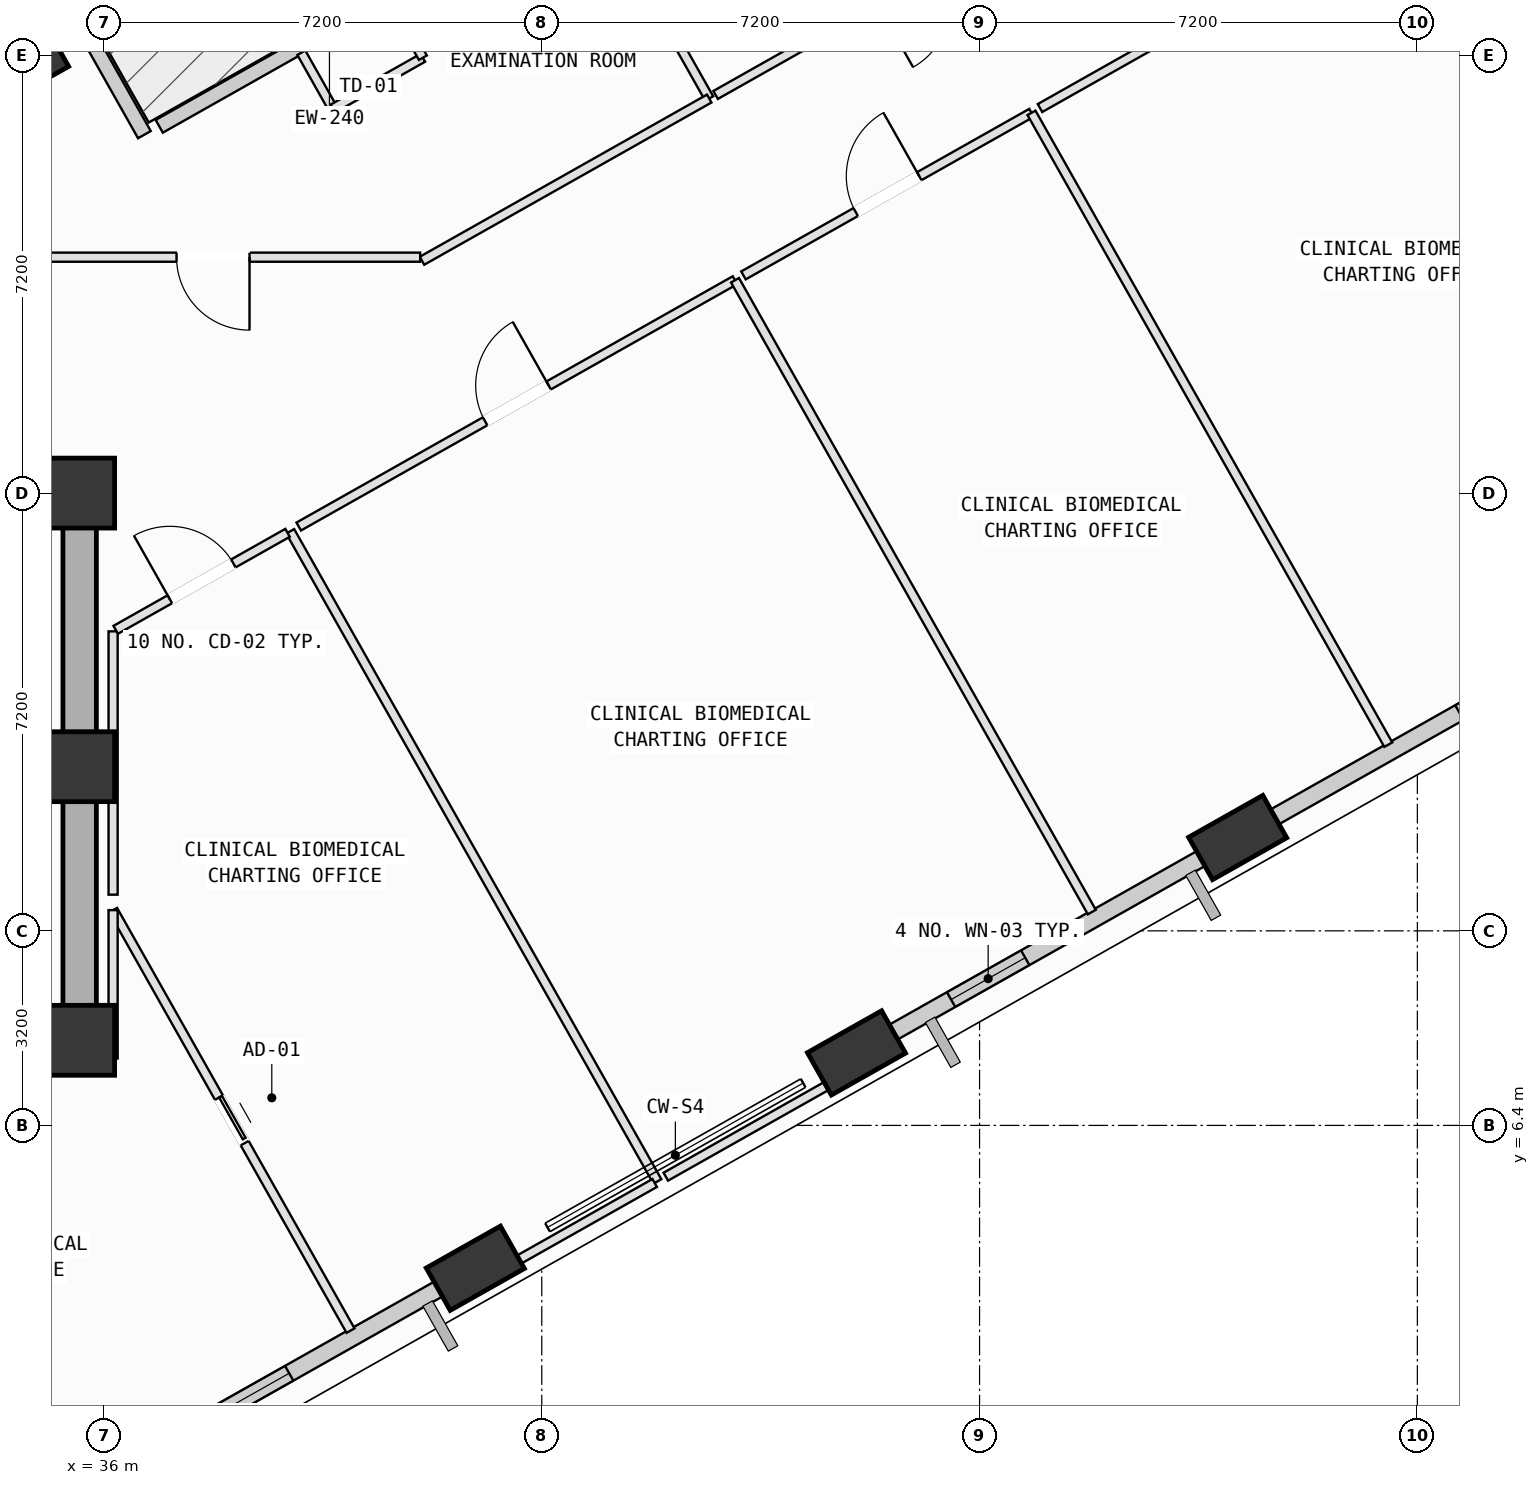
"""IFC4 building model, lengths in metres.
Left out: names, types, materials, properties, quantities, classifications, styles, units other than length and angle.
Written with IfcOpenShell. Run it as: python <this file> out.ifc"""

import sys

from ifc_helpers import new_model, si_unit, direction, frame, frame_2d, origin, origin_2d, place, context, subcontext, project, spatial, rectangle, extrude, element, fill, save


model = new_model("IFC4")
c1 = context("Model", 3, precision=1e-05, world=origin(), true_north=direction((0.0, 1.0)))
c2 = subcontext(c1, "Body", "Model", "MODEL_VIEW")
j1 = project(units=[si_unit("LENGTHUNIT", "METRE"), si_unit("PLANEANGLEUNIT", "RADIAN")], contexts=[c1])
p1 = place(None, origin())
s1 = spatial("IfcSite", under=j1, at=p1, CompositionType="ELEMENT")
p2 = place(p1, origin())
s2 = spatial("IfcBuilding", under=s1, at=p2, CompositionType="ELEMENT")
p3 = place(p2, frame((0.0, 0.0, 149.8)))
s3 = spatial("IfcBuildingStorey", under=s2, at=p3, CompositionType="ELEMENT", Elevation=149.8)
for number, where, z_axis, x_axis in (
    (1, (35.6, 7.8, 0.0), (0.0, 0.0, 1.0), (1.0, 0.0, 0.0)),
    (2, (35.6, 12.3, 0.0), (0.0, 0.0, 1.0), (1.0, 0.0, 0.0)),
    (3, (35.6, 16.8, 0.0), (0.0, 0.0, 1.0), (1.0, 0.0, 0.0)),
):
    element("IfcColumn", number, at=place(p3, frame(where, z_axis=z_axis, x_axis=x_axis)), inside=s3, PredefinedType="COLUMN", context=c2, shape_type="SweptSolid", body=[
        extrude(rectangle(XDim=1.15, YDim=1.15, at=origin_2d()), origin(), (0.0, 0.0, 1.0), 4.0),
    ])
p4 = place(p3, frame((42.107, 4.051, 0.067), z_axis=(0.08539199057, 0.035801565923, 0.995704000104), x_axis=(-0.78816883904, 0.613773060451, 0.045524844111)))
e4 = element("IfcColumn", 4, at=p4, inside=s3, PredefinedType="COLUMN", context=c2, shape_type="SweptSolid", body=[
    extrude(rectangle(XDim=1.4, YDim=0.8, at=origin_2d()), origin(), (0.0, 0.0, 1.0), 3.948),
])
p5 = place(p3, frame((48.376, 7.593, 0.067), z_axis=(0.07055831731, 0.061529820967, 0.995608158359), x_axis=(-0.941245694793, 0.334571211542, 0.046028756663)))
e5 = element("IfcColumn", 5, at=p5, inside=s3, PredefinedType="COLUMN", context=c2, shape_type="SweptSolid", body=[
    extrude(rectangle(XDim=1.4, YDim=0.8, at=origin_2d()), origin(), (0.0, 0.0, 1.0), 3.948),
])
p6 = place(p3, frame((54.645, 11.135, 0.074), z_axis=(0.055632037053, 0.087253806723, 0.994631514515), x_axis=(-0.997144782381, 0.055801129661, 0.050877469454)))
e6 = element("IfcColumn", 6, at=p6, inside=s3, PredefinedType="COLUMN", context=c2, shape_type="SweptSolid", body=[
    extrude(rectangle(XDim=1.4, YDim=0.8, at=origin_2d()), origin(), (0.0, 0.0, 1.0), 3.945),
])
p7 = place(p3, frame((34.612, 23.821, 0.007), z_axis=(0.004036875309, 0.004220369641, 0.999982945913), x_axis=(-0.969109138481, 0.246615556484, 0.002871412915)))
e7 = element("IfcColumn", 7, at=p7, inside=s3, PredefinedType="COLUMN", context=c2, shape_type="SweptSolid", body=[
    extrude(rectangle(XDim=1.4, YDim=0.8, at=origin_2d()), origin(), (0.0, 0.0, 1.0), 3.991),
])
p8 = place(p3, frame((36.909, 22.833, 0.0), z_axis=(0.0, 0.0, 1.0), x_axis=(0.870780952781, 0.491671162744, 0.0)))
e8 = element("IfcWall", 8, at=p8, inside=s3, PredefinedType="SOLIDWALL", context=c2, shape_type="SweptSolid", body=[
    extrude(rectangle(XDim=6.96, YDim=0.24, at=frame_2d((3.48, 0.0))), origin(), (0.0, 0.0, 1.0), 3.165),
])
p9 = place(p8, frame((2.93, 0.0, 0.0)))
e9 = element("IfcOpeningElement", 9, at=p9, cuts=e8, PredefinedType="OPENING", context=c2, shape_type="SweptSolid", body=[
    extrude(rectangle(XDim=1.1, YDim=2.15, at=frame_2d((0.55, 1.075))), frame((0.0, 0.13, 0.0), z_axis=(0.0, -1.0, 0.0), x_axis=(1.0, 0.0, 0.0)), (0.0, 0.0, 1.0), 0.26),
])
p10 = place(p3, frame((35.436, 24.872, 0.0), z_axis=(0.0, 0.0, 1.0), x_axis=(0.491725759478, -0.870750123437, 0.0)))
e10 = element("IfcWall", 10, at=p10, inside=s3, PredefinedType="SOLIDWALL", context=c2, shape_type="SweptSolid", body=[
    extrude(rectangle(XDim=2.5, YDim=0.24, at=frame_2d((1.25, 0.0))), origin(), (0.0, 0.0, 1.0), 3.165),
])
p11 = place(p3, frame((41.83, 3.896, 0.0), z_axis=(0.0, 0.0, 1.0), x_axis=(-0.870772762929, -0.491685667211, 0.0)))
e11 = element("IfcWall", 11, at=p11, inside=s3, PredefinedType="SOLIDWALL", context=c2, shape_type="SweptSolid", body=[
    extrude(rectangle(XDim=6.214, YDim=0.28, at=frame_2d((3.107, 0.0))), origin(), (0.0, 0.0, 1.0), 3.165),
])
p12 = place(p11, frame((3.198, 0.0, 0.75)))
e12 = element("IfcOpeningElement", 12, at=p12, cuts=e11, PredefinedType="OPENING", context=c2, shape_type="SweptSolid", body=[
    extrude(rectangle(XDim=2.0, YDim=1.95, at=frame_2d((1.0, 0.975))), frame((0.0, 0.15, 0.0), z_axis=(0.0, -1.0, 0.0), x_axis=(1.0, 0.0, 0.0)), (0.0, 0.0, 1.0), 0.3),
])
p13 = place(p3, frame((54.377, 10.979, 0.0), z_axis=(0.0, 0.0, 1.0), x_axis=(-0.870780660268, -0.491671680803, 0.0)))
e13 = element("IfcWall", 13, at=p13, inside=s3, PredefinedType="SOLIDWALL", context=c2, shape_type="SweptSolid", body=[
    extrude(rectangle(XDim=6.218, YDim=0.28, at=frame_2d((3.109, 0.0))), origin(), (0.0, 0.0, 1.0), 3.165),
])
p14 = place(p13, frame((3.705, 0.0, 0.75)))
e14 = element("IfcOpeningElement", 14, at=p14, cuts=e13, PredefinedType="OPENING", context=c2, shape_type="SweptSolid", body=[
    extrude(rectangle(XDim=1.4, YDim=1.85, at=frame_2d((0.7, 0.925))), frame((0.0, 0.15, 0.0), z_axis=(0.0, -1.0, 0.0), x_axis=(1.0, 0.0, 0.0)), (0.0, 0.0, 1.0), 0.3),
])
p15 = place(p3, frame((60.66, 14.527, 0.0), z_axis=(0.0, 0.0, 1.0), x_axis=(-0.870773266838, -0.49168477479, 0.0)))
e15 = element("IfcWall", 15, at=p15, inside=s3, PredefinedType="SOLIDWALL", context=c2, shape_type="SweptSolid", body=[
    extrude(rectangle(XDim=6.242, YDim=0.28, at=frame_2d((3.121, 0.0))), origin(), (0.0, 0.0, 1.0), 3.165),
])
p16 = place(p15, frame((0.92, 0.0, 0.75)))
e16 = element("IfcOpeningElement", 16, at=p16, cuts=e15, PredefinedType="OPENING", context=c2, shape_type="SweptSolid", body=[
    extrude(rectangle(XDim=1.8, YDim=2.05, at=frame_2d((0.9, 1.025))), frame((0.0, 0.15, 0.0), z_axis=(0.0, -1.0, 0.0), x_axis=(1.0, 0.0, 0.0)), (0.0, 0.0, 1.0), 0.3),
])
p17 = place(p3, frame((24.8, 7.8, 0.0), z_axis=(0.0, 0.0, 1.0), x_axis=(1.0, 0.0, 0.0)))
e17 = element("IfcWall", 17, at=p17, inside=s3, PredefinedType="SHEAR", context=c2, shape_type="SweptSolid", body=[
    extrude(rectangle(XDim=10.8, YDim=0.55, at=frame_2d((5.4, 0.0))), origin(), (0.0, 0.0, 1.0), 3.78),
])
p18 = place(p3, frame((35.6, 7.8, 0.0), z_axis=(0.0, 0.0, 1.0), x_axis=(0.0, 1.0, 0.0)))
e18 = element("IfcWall", 18, at=p18, inside=s3, PredefinedType="SHEAR", context=c2, shape_type="SweptSolid", body=[
    extrude(rectangle(XDim=9.0, YDim=0.55, at=frame_2d((4.5, 0.0))), origin(), (0.0, 0.0, 1.0), 3.78),
])
p19 = place(p3, frame((36.15, 9.941, 0.0), z_axis=(0.0, 0.0, 1.0), x_axis=(0.491673321282, -0.870779733997, 0.0)))
e19 = element("IfcWall", 19, at=p19, inside=s3, PredefinedType="PARTITIONING", context=c2, shape_type="SweptSolid", body=[
    extrude(rectangle(XDim=7.942, YDim=0.15, at=frame_2d((3.971, 0.0))), origin(), (0.0, 0.0, 1.0), 3.78),
])
p20 = place(p19, frame((3.541, 0.0, 0.0)))
e20 = element("IfcOpeningElement", 20, at=p20, cuts=e19, PredefinedType="OPENING", context=c2, shape_type="SweptSolid", body=[
    extrude(rectangle(XDim=0.86, YDim=2.06, at=frame_2d((0.43, 1.03))), frame((0.0, 0.085, 0.0), z_axis=(0.0, -1.0, 0.0), x_axis=(1.0, 0.0, 0.0)), (0.0, 0.0, 1.0), 0.17),
])
p21 = place(p3, frame((35.6, 7.5, 0.0), z_axis=(0.0, 0.0, 1.0), x_axis=(1.0, 0.0, 0.0)))
e21 = element("IfcWall", 21, at=p21, inside=s3, PredefinedType="PARTITIONING", context=c2, shape_type="SweptSolid", body=[
    extrude(rectangle(XDim=0.55, YDim=0.15, at=frame_2d((0.275, 0.0))), origin(), (0.0, 0.0, 1.0), 2.765),
])
p22 = place(p3, frame((36.15, 7.5, 0.0), z_axis=(0.0, 0.0, 1.0), x_axis=(0.0, 1.0, 0.0)))
e22 = element("IfcWall", 22, at=p22, inside=s3, PredefinedType="PARTITIONING", context=c2, shape_type="SweptSolid", body=[
    extrude(rectangle(XDim=2.441, YDim=0.15, at=frame_2d((1.22, 0.0))), origin(), (0.0, 0.0, 1.0), 2.765),
])
p23 = place(p3, frame((39.063, 16.171, 0.0), z_axis=(0.0, 0.0, 1.0), x_axis=(0.491704764432, -0.870761979323, 0.0)))
e23 = element("IfcWall", 23, at=p23, inside=s3, PredefinedType="PARTITIONING", context=c2, shape_type="SweptSolid", body=[
    extrude(rectangle(XDim=12.28, YDim=0.15, at=frame_2d((6.14, 0.0))), origin(), (0.0, 0.0, 1.0), 3.78),
])
p24 = place(p3, frame((45.057, 5.453, 0.0), z_axis=(0.0, 0.0, 1.0), x_axis=(-0.87075356708, -0.49171966141, 0.0)))
e24 = element("IfcWall", 24, at=p24, inside=s3, PredefinedType="PARTITIONING", context=c2, shape_type="SweptSolid", body=[
    extrude(rectangle(XDim=3.575, YDim=0.15, at=frame_2d((1.787, 0.0))), origin(), (0.0, 0.0, 1.0), 3.165),
])
p25 = place(p3, frame((36.15, 10.195, 0.0), z_axis=(0.0, 0.0, 1.0), x_axis=(0.0, 1.0, 0.0)))
e25 = element("IfcWall", 25, at=p25, inside=s3, PredefinedType="PARTITIONING", context=c2, shape_type="SweptSolid", body=[
    extrude(rectangle(XDim=4.331, YDim=0.15, at=frame_2d((2.166, 0.0))), origin(), (0.0, 0.0, 1.0), 3.78),
])
p26 = place(p3, frame((36.193, 14.551, 0.0), z_axis=(0.0, 0.0, 1.0), x_axis=(0.870865345637, 0.49152166765, 0.0)))
e26 = element("IfcWall", 26, at=p26, inside=s3, PredefinedType="PARTITIONING", context=c2, shape_type="SweptSolid", body=[
    extrude(rectangle(XDim=3.245, YDim=0.15, at=frame_2d((1.623, 0.0))), origin(), (0.0, 0.0, 1.0), 3.78),
])
p27 = place(p26, frame((1.022, 0.0, 0.0)))
e27 = element("IfcOpeningElement", 27, at=p27, cuts=e26, PredefinedType="OPENING", context=c2, shape_type="SweptSolid", body=[
    extrude(rectangle(XDim=1.2, YDim=2.15, at=frame_2d((0.6, 1.075))), frame((0.0, 0.085, 0.0), z_axis=(0.0, -1.0, 0.0), x_axis=(1.0, 0.0, 0.0)), (0.0, 0.0, 1.0), 0.17),
])
p28 = place(p3, frame((39.203, 16.25, 0.0), z_axis=(0.0, 0.0, 1.0), x_axis=(0.870793414879, 0.491649090921, 0.0)))
e28 = element("IfcWall", 28, at=p28, inside=s3, PredefinedType="PARTITIONING", context=c2, shape_type="SweptSolid", body=[
    extrude(rectangle(XDim=8.24, YDim=0.15, at=frame_2d((4.12, 0.0))), origin(), (0.0, 0.0, 1.0), 3.78),
])
p29 = place(p28, frame((3.52, 0.0, 0.0)))
e29 = element("IfcOpeningElement", 29, at=p29, cuts=e28, PredefinedType="OPENING", context=c2, shape_type="SweptSolid", body=[
    extrude(rectangle(XDim=1.2, YDim=2.15, at=frame_2d((0.6, 1.075))), frame((0.0, 0.085, 0.0), z_axis=(0.0, -1.0, 0.0), x_axis=(1.0, 0.0, 0.0)), (0.0, 0.0, 1.0), 0.17),
])
p30 = place(p3, frame((46.378, 20.301, 0.0), z_axis=(0.0, 0.0, 1.0), x_axis=(0.491699953703, -0.870764695844, 0.0)))
e30 = element("IfcWall", 30, at=p30, inside=s3, PredefinedType="PARTITIONING", context=c2, shape_type="SweptSolid", body=[
    extrude(rectangle(XDim=11.934, YDim=0.15, at=frame_2d((5.967, 0.0))), origin(), (0.0, 0.0, 1.0), 3.415),
])
p31 = place(p3, frame((49.075, 7.722, 0.0), z_axis=(0.0, 0.0, 1.0), x_axis=(-0.870810528697, -0.491618778233, 0.0)))
e31 = element("IfcWall", 31, at=p31, inside=s3, PredefinedType="PARTITIONING", context=c2, shape_type="SweptSolid", body=[
    extrude(rectangle(XDim=4.404, YDim=0.15, at=frame_2d((2.202, 0.0))), origin(), (0.0, 0.0, 1.0), 3.165),
])
p32 = place(p3, frame((46.517, 20.38, 0.0), z_axis=(0.0, 0.0, 1.0), x_axis=(0.870819350586, 0.491603151581, 0.0)))
e32 = element("IfcWall", 32, at=p32, inside=s3, PredefinedType="PARTITIONING", context=c2, shape_type="SweptSolid", body=[
    extrude(rectangle(XDim=5.439, YDim=0.15, at=frame_2d((2.72, 0.0))), origin(), (0.0, 0.0, 1.0), 2.765),
])
p33 = place(p32, frame((2.12, 0.0, 0.0)))
e33 = element("IfcOpeningElement", 33, at=p33, cuts=e32, PredefinedType="OPENING", context=c2, shape_type="SweptSolid", body=[
    extrude(rectangle(XDim=1.2, YDim=2.15, at=frame_2d((0.6, 1.075))), frame((0.0, 0.085, 0.0), z_axis=(0.0, -1.0, 0.0), x_axis=(1.0, 0.0, 0.0)), (0.0, 0.0, 1.0), 0.17),
])
p34 = place(p3, frame((51.254, 23.054, 0.0), z_axis=(0.0, 0.0, 1.0), x_axis=(0.49170871252, -0.870759749892, 0.0)))
e34 = element("IfcWall", 34, at=p34, inside=s3, PredefinedType="PARTITIONING", context=c2, shape_type="SweptSolid", body=[
    extrude(rectangle(XDim=11.934, YDim=0.15, at=frame_2d((5.967, 0.0))), origin(), (0.0, 0.0, 1.0), 3.78),
])
p35 = place(p3, frame((55.337, 11.258, 0.0), z_axis=(0.0, 0.0, 1.0), x_axis=(-0.870427282353, -0.492297010082, 0.0)))
e35 = element("IfcWall", 35, at=p35, inside=s3, PredefinedType="PARTITIONING", context=c2, shape_type="SweptSolid", body=[
    extrude(rectangle(XDim=0.973, YDim=0.15, at=frame_2d((0.486, 0.0))), origin(), (0.0, 0.0, 1.0), 3.165),
])
p36 = place(p3, frame((51.394, 23.133, 0.0), z_axis=(0.0, 0.0, 1.0), x_axis=(0.870715207894, 0.491787582948, 0.0)))
e36 = element("IfcWall", 36, at=p36, inside=s3, PredefinedType="PARTITIONING", context=c2, shape_type="SweptSolid", body=[
    extrude(rectangle(XDim=7.727, YDim=0.15, at=frame_2d((3.864, 0.0))), origin(), (0.0, 0.0, 1.0), 2.765),
])
p37 = place(p36, frame((3.263, 0.0, 0.0)))
e37 = element("IfcOpeningElement", 37, at=p37, cuts=e36, PredefinedType="OPENING", context=c2, shape_type="SweptSolid", body=[
    extrude(rectangle(XDim=1.2, YDim=2.15, at=frame_2d((0.6, 1.075))), frame((0.0, 0.085, 0.0), z_axis=(0.0, -1.0, 0.0), x_axis=(1.0, 0.0, 0.0)), (0.0, 0.0, 1.0), 0.17),
])
p38 = place(p3, frame((32.826, 23.445, 0.0), z_axis=(0.0, 0.0, 1.0), x_axis=(0.870956203304, 0.491360653621, 0.0)))
e38 = element("IfcWall", 38, at=p38, inside=s3, PredefinedType="PARTITIONING", context=c2, shape_type="SweptSolid", body=[
    extrude(rectangle(XDim=2.888, YDim=0.15, at=frame_2d((1.444, 0.0))), origin(), (0.0, 0.0, 1.0), 3.78),
])
p39 = place(p3, frame((39.246, 24.043, 0.0), z_axis=(0.0, 0.0, 1.0), x_axis=(0.490920442926, -0.871204406966, 0.0)))
e39 = element("IfcWall", 39, at=p39, inside=s3, PredefinedType="PARTITIONING", context=c2, shape_type="SweptSolid", body=[
    extrude(rectangle(XDim=1.055, YDim=0.15, at=frame_2d((0.527, 0.0))), origin(), (0.0, 0.0, 1.0), 3.78),
])
p40 = place(p3, frame((39.764, 23.124, 0.0), z_axis=(0.0, 0.0, 1.0), x_axis=(0.870880797737, 0.491494289014, 0.0)))
e40 = element("IfcWall", 40, at=p40, inside=s3, PredefinedType="PARTITIONING", context=c2, shape_type="SweptSolid", body=[
    extrude(rectangle(XDim=1.701, YDim=0.15, at=frame_2d((0.851, 0.0))), origin(), (0.0, 0.0, 1.0), 3.415),
])
p41 = place(p3, frame((41.245, 23.96, 0.0), z_axis=(0.0, 0.0, 1.0), x_axis=(-0.491798070735, 0.870709284217, 0.0)))
e41 = element("IfcWall", 41, at=p41, inside=s3, PredefinedType="PARTITIONING", context=c2, shape_type="SweptSolid", body=[
    extrude(rectangle(XDim=1.055, YDim=0.15, at=frame_2d((0.528, 0.0))), origin(), (0.0, 0.0, 1.0), 3.78),
])
p42 = place(p3, frame((43.611, 27.439, 0.0), z_axis=(0.0, 0.0, 1.0), x_axis=(0.491647001165, -0.87079459475, 0.0)))
e42 = element("IfcWall", 42, at=p42, inside=s3, PredefinedType="PARTITIONING", context=c2, shape_type="SweptSolid", body=[
    extrude(rectangle(XDim=4.766, YDim=0.15, at=frame_2d((2.383, 0.0))), origin(), (0.0, 0.0, 1.0), 3.415),
])
p43 = place(p3, frame((45.954, 23.289, 0.0), z_axis=(0.0, 0.0, 1.0), x_axis=(-0.870735432675, -0.491751773037, 0.0)))
e43 = element("IfcWall", 43, at=p43, inside=s3, PredefinedType="PARTITIONING", context=c2, shape_type="SweptSolid", body=[
    extrude(rectangle(XDim=5.426, YDim=0.15, at=frame_2d((2.713, 0.0))), origin(), (0.0, 0.0, 1.0), 3.78),
])
p44 = place(p3, frame((41.2, 20.68, 0.0), z_axis=(0.0, 0.0, 1.0), x_axis=(-1.0, 0.0, 0.0)))
e44 = element("IfcWall", 44, at=p44, inside=s3, PredefinedType="PARTITIONING", context=c2, shape_type="SweptSolid", body=[
    extrude(rectangle(XDim=6.813, YDim=0.15, at=frame_2d((3.406, 0.0))), origin(), (0.0, 0.0, 1.0), 3.415),
])
p45 = place(p44, frame((2.806, 0.0, 0.0)))
e45 = element("IfcOpeningElement", 45, at=p45, cuts=e44, PredefinedType="OPENING", context=c2, shape_type="SweptSolid", body=[
    extrude(rectangle(XDim=1.2, YDim=2.15, at=frame_2d((0.6, 1.075))), frame((0.0, 0.085, 0.0), z_axis=(0.0, -1.0, 0.0), x_axis=(1.0, 0.0, 0.0)), (0.0, 0.0, 1.0), 0.17),
])
p46 = place(p3, frame((52.42, 26.94, 0.0), z_axis=(0.0, 0.0, 1.0), x_axis=(-0.870751378519, -0.491723536967, 0.0)))
e46 = element("IfcWall", 46, at=p46, inside=s3, PredefinedType="PARTITIONING", context=c2, shape_type="SweptSolid", body=[
    extrude(rectangle(XDim=7.305, YDim=0.15, at=frame_2d((3.652, 0.0))), origin(), (0.0, 0.0, 1.0), 3.78),
])
p47 = place(p46, frame((3.052, 0.0, 0.0)))
e47 = element("IfcOpeningElement", 47, at=p47, cuts=e46, PredefinedType="OPENING", context=c2, shape_type="SweptSolid", body=[
    extrude(rectangle(XDim=1.2, YDim=2.15, at=frame_2d((0.6, 1.075))), frame((0.0, 0.085, 0.0), z_axis=(0.0, -1.0, 0.0), x_axis=(1.0, 0.0, 0.0)), (0.0, 0.0, 1.0), 0.17),
])
p48 = place(p12, origin())
e48 = element("IfcWindow", 48, at=p48, inside=s3, PartitioningType="SINGLE_PANEL", PredefinedType="WINDOW", context=c2, shape_type="SweptSolid", body=[
    extrude(rectangle(XDim=2.0, YDim=1.95, at=frame_2d((1.0, 0.975))), frame((0.0, 0.03, 0.0), z_axis=(0.0, -1.0, 0.0), x_axis=(1.0, 0.0, 0.0)), (0.0, 0.0, 1.0), 0.06),
])
fill(e12, e48)
p49 = place(p14, origin())
e49 = element("IfcWindow", 49, at=p49, inside=s3, PartitioningType="SINGLE_PANEL", PredefinedType="WINDOW", context=c2, shape_type="SweptSolid", body=[
    extrude(rectangle(XDim=1.4, YDim=1.85, at=frame_2d((0.7, 0.925))), frame((0.0, 0.03, 0.0), z_axis=(0.0, -1.0, 0.0), x_axis=(1.0, 0.0, 0.0)), (0.0, 0.0, 1.0), 0.06),
])
fill(e14, e49)
p50 = place(p16, origin())
e50 = element("IfcWindow", 50, at=p50, inside=s3, PartitioningType="SINGLE_PANEL", PredefinedType="WINDOW", context=c2, shape_type="SweptSolid", body=[
    extrude(rectangle(XDim=1.8, YDim=2.05, at=frame_2d((0.9, 1.025))), frame((0.0, 0.03, 0.0), z_axis=(0.0, -1.0, 0.0), x_axis=(1.0, 0.0, 0.0)), (0.0, 0.0, 1.0), 0.06),
])
fill(e16, e50)
p51 = place(p27, origin())
e51 = element("IfcDoor", 51, at=p51, inside=s3, OperationType="SINGLE_SWING_LEFT", PredefinedType="DOOR", context=c2, shape_type="SweptSolid", body=[
    extrude(rectangle(XDim=1.2, YDim=2.15, at=frame_2d((0.6, 1.075))), frame((0.0, 0.025, 0.0), z_axis=(0.0, -1.0, 0.0), x_axis=(1.0, 0.0, 0.0)), (0.0, 0.0, 1.0), 0.05),
])
fill(e27, e51)
p52 = place(p29, origin())
e52 = element("IfcDoor", 52, at=p52, inside=s3, OperationType="SINGLE_SWING_RIGHT", PredefinedType="DOOR", context=c2, shape_type="SweptSolid", body=[
    extrude(rectangle(XDim=1.2, YDim=2.15, at=frame_2d((0.6, 1.075))), frame((0.0, 0.025, 0.0), z_axis=(0.0, -1.0, 0.0), x_axis=(1.0, 0.0, 0.0)), (0.0, 0.0, 1.0), 0.05),
])
fill(e29, e52)
p53 = place(p33, origin())
e53 = element("IfcDoor", 53, at=p53, inside=s3, OperationType="SINGLE_SWING_RIGHT", PredefinedType="DOOR", context=c2, shape_type="SweptSolid", body=[
    extrude(rectangle(XDim=1.2, YDim=2.15, at=frame_2d((0.6, 1.075))), frame((0.0, 0.025, 0.0), z_axis=(0.0, -1.0, 0.0), x_axis=(1.0, 0.0, 0.0)), (0.0, 0.0, 1.0), 0.05),
])
fill(e33, e53)
p54 = place(p45, origin())
e54 = element("IfcDoor", 54, at=p54, inside=s3, OperationType="SINGLE_SWING_LEFT", PredefinedType="DOOR", context=c2, shape_type="SweptSolid", body=[
    extrude(rectangle(XDim=1.2, YDim=2.15, at=frame_2d((0.6, 1.075))), frame((0.0, 0.025, 0.0), z_axis=(0.0, -1.0, 0.0), x_axis=(1.0, 0.0, 0.0)), (0.0, 0.0, 1.0), 0.05),
])
fill(e45, e54)
p55 = place(p20, origin())
e55 = element("IfcDoor", 55, at=p55, inside=s3, OperationType="SLIDING_TO_LEFT", PredefinedType="DOOR", context=c2, shape_type="SweptSolid", body=[
    extrude(rectangle(XDim=0.86, YDim=2.06, at=frame_2d((0.43, 1.03))), frame((0.0, 0.025, 0.0), z_axis=(0.0, -1.0, 0.0), x_axis=(1.0, 0.0, 0.0)), (0.0, 0.0, 1.0), 0.05),
])
fill(e20, e55)
save(model, sys.argv[1])
